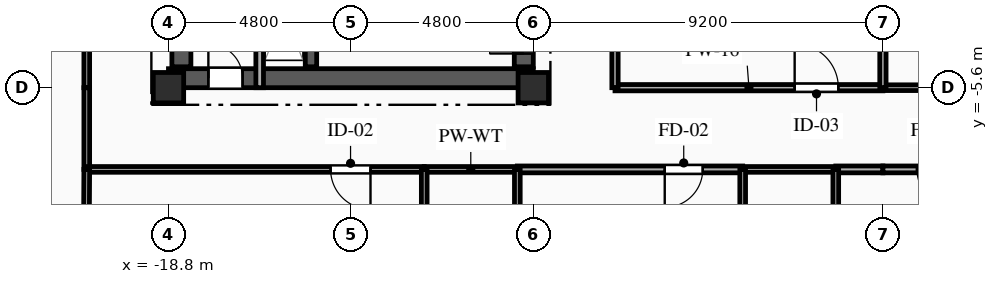
"""IFC4 building model, lengths in metres.
Left out: names, types, materials, properties, quantities, classifications, styles, units other than length and angle.
Written with IfcOpenShell. Run it as: python <this file> out.ifc"""

import sys

from ifc_helpers import new_model, si_unit, direction, frame, frame_2d, origin, origin_2d, place, context, subcontext, project, spatial, rectangle, extrude, element, fill, save


model = new_model("IFC4")
c1 = context("Model", 3, precision=1e-05, world=origin(), true_north=direction((0.0, 1.0)))
c2 = subcontext(c1, "Body", "Model", "MODEL_VIEW")
j1 = project(units=[si_unit("LENGTHUNIT", "METRE"), si_unit("PLANEANGLEUNIT", "RADIAN")], contexts=[c1])
p1 = place(None, origin())
s1 = spatial("IfcSite", under=j1, at=p1, CompositionType="ELEMENT")
p2 = place(p1, origin())
s2 = spatial("IfcBuilding", under=s1, at=p2, CompositionType="ELEMENT")
p3 = place(p2, frame((0.0, 0.0, 193.05)))
s3 = spatial("IfcBuildingStorey", under=s2, at=p3, CompositionType="ELEMENT", Elevation=193.05)
for number, where, z_axis, x_axis in (
    (1, (-18.8, -5.6, 0.0), (0.0, 0.0, 1.0), (1.0, 0.0, 0.0)),
    (2, (-9.2, -5.6, 0.0), (0.0, 0.0, 1.0), (1.0, 0.0, 0.0)),
):
    element("IfcColumn", number, at=place(p3, frame(where, z_axis=z_axis, x_axis=x_axis)), inside=s3, PredefinedType="COLUMN", context=c2, shape_type="SweptSolid", body=[
        extrude(rectangle(XDim=0.8, YDim=0.8, at=origin_2d()), origin(), (0.0, 0.0, 1.0), 3.35),
    ])
p4 = place(p3, frame((-18.8, -5.35, 0.0), z_axis=(0.0, 0.0, 1.0), x_axis=(1.0, 0.0, 0.0)))
e3 = element("IfcWall", 3, at=p4, inside=s3, PredefinedType="SHEAR", context=c2, shape_type="SweptSolid", body=[
    extrude(rectangle(XDim=9.6, YDim=0.5, at=frame_2d((4.8, 0.0))), origin(), (0.0, 0.0, 1.0), 3.04),
])
p5 = place(p4, frame((1.05, 0.0, 0.0)))
e4 = element("IfcOpeningElement", 4, at=p5, cuts=e3, PredefinedType="OPENING", context=c2, shape_type="SweptSolid", body=[
    extrude(rectangle(XDim=0.9, YDim=2.1, at=frame_2d((0.45, 1.05))), frame((0.0, 0.26, 0.0), z_axis=(0.0, -1.0, 0.0), x_axis=(1.0, 0.0, 0.0)), (0.0, 0.0, 1.0), 0.52),
])
p6 = place(p3, frame((-18.46, -5.05, 0.0), z_axis=(0.0, 0.0, 1.0), x_axis=(0.0, 1.0, 0.0)))
e5 = element("IfcWall", 5, at=p6, inside=s3, PredefinedType="SHEAR", context=c2, shape_type="SweptSolid", body=[
    extrude(rectangle(XDim=10.1, YDim=0.5, at=frame_2d((5.05, 0.0))), origin(), (0.0, 0.0, 1.0), 3.04),
])
p7 = place(p3, frame((-9.45, -5.05, 0.0), z_axis=(0.0, 0.0, 1.0), x_axis=(0.0, 1.0, 0.0)))
e6 = element("IfcWall", 6, at=p7, inside=s3, PredefinedType="SHEAR", context=c2, shape_type="SweptSolid", body=[
    extrude(rectangle(XDim=10.1, YDim=0.5, at=frame_2d((5.05, 0.0))), origin(), (0.0, 0.0, 1.0), 3.04),
])
p8 = place(p7, frame((7.15, 0.0, 0.0)))
e7 = element("IfcOpeningElement", 7, at=p8, cuts=e6, PredefinedType="OPENING", context=c2, shape_type="SweptSolid", body=[
    extrude(rectangle(XDim=0.9, YDim=2.1, at=frame_2d((0.45, 1.05))), frame((0.0, 0.26, 0.0), z_axis=(0.0, -1.0, 0.0), x_axis=(1.0, 0.0, 0.0)), (0.0, 0.0, 1.0), 0.52),
])
p9 = place(p7, frame((2.4, 0.0, 0.0)))
e8 = element("IfcOpeningElement", 8, at=p9, cuts=e6, PredefinedType="OPENING", context=c2, shape_type="SweptSolid", body=[
    extrude(rectangle(XDim=1.2, YDim=2.15, at=frame_2d((0.6, 1.075))), frame((0.0, 0.26, 0.0), z_axis=(0.0, -1.0, 0.0), x_axis=(1.0, 0.0, 0.0)), (0.0, 0.0, 1.0), 0.52),
])
p10 = place(p7, frame((0.35, 0.0, 0.0)))
e9 = element("IfcOpeningElement", 9, at=p10, cuts=e6, PredefinedType="OPENING", context=c2, shape_type="SweptSolid", body=[
    extrude(rectangle(XDim=0.9, YDim=2.1, at=frame_2d((0.45, 1.05))), frame((0.0, 0.26, 0.0), z_axis=(0.0, -1.0, 0.0), x_axis=(1.0, 0.0, 0.0)), (0.0, 0.0, 1.0), 0.52),
])
p11 = place(p7, frame((5.0, 0.0, 0.0)))
e10 = element("IfcOpeningElement", 10, at=p11, cuts=e6, PredefinedType="OPENING", context=c2, shape_type="SweptSolid", body=[
    extrude(rectangle(XDim=0.9, YDim=2.1, at=frame_2d((0.45, 1.05))), frame((0.0, 0.26, 0.0), z_axis=(0.0, -1.0, 0.0), x_axis=(1.0, 0.0, 0.0)), (0.0, 0.0, 1.0), 0.52),
])
p12 = place(p3, frame((-15.05, -5.05, 0.0), z_axis=(0.0, 0.0, 1.0), x_axis=(0.0, 1.0, 0.0)))
e11 = element("IfcWall", 11, at=p12, inside=s3, PredefinedType="SHEAR", context=c2, shape_type="SweptSolid", body=[
    extrude(rectangle(XDim=10.1, YDim=0.3, at=frame_2d((5.05, 0.0))), origin(), (0.0, 0.0, 1.0), 3.04),
])
p13 = place(p3, frame((-16.4, -5.6, 0.0), z_axis=(0.0, 0.0, 1.0), x_axis=(0.0, 1.0, 0.0)))
e12 = element("IfcWall", 12, at=p13, inside=s3, PredefinedType="PARTITIONING", context=c2, shape_type="SweptSolid", body=[
    extrude(rectangle(XDim=3.49, YDim=0.2, at=frame_2d((1.745, 0.0))), origin(), (0.0, 0.0, 1.0), 3.04),
])
p14 = place(p3, frame((-20.95, -7.75, 0.0), z_axis=(0.0, 0.0, 1.0), x_axis=(0.0, 1.0, 0.0)))
e13 = element("IfcWall", 13, at=p14, inside=s3, PredefinedType="PARTITIONING", context=c2, shape_type="SweptSolid", body=[
    extrude(rectangle(XDim=2.15, YDim=0.15, at=frame_2d((1.075, 0.0))), origin(), (0.0, 0.0, 1.0), 3.04),
])
p15 = place(p3, frame((-12.07, -7.75, 0.0), z_axis=(0.0, 0.0, 1.0), x_axis=(-1.0, 0.0, 0.0)))
e14 = element("IfcWall", 14, at=p15, inside=s3, PredefinedType="PARTITIONING", context=c2, shape_type="SweptSolid", body=[
    extrude(rectangle(XDim=8.88, YDim=0.15, at=frame_2d((4.44, 0.0))), origin(), (0.0, 0.0, 1.0), 3.04),
])
p16 = place(p15, frame((1.414, 0.0, 0.0)))
e15 = element("IfcOpeningElement", 15, at=p16, cuts=e14, PredefinedType="OPENING", context=c2, shape_type="SweptSolid", body=[
    extrude(rectangle(XDim=1.05, YDim=2.15, at=frame_2d((0.525, 1.075))), frame((0.0, 0.085, 0.0), z_axis=(0.0, -1.0, 0.0), x_axis=(1.0, 0.0, 0.0)), (0.0, 0.0, 1.0), 0.17),
])
p17 = place(p3, frame((-3.69, -7.75, 0.0), z_axis=(0.0, 0.0, 1.0), x_axis=(-1.0, 0.0, 0.0)))
e16 = element("IfcWall", 16, at=p17, inside=s3, PredefinedType="PARTITIONING", context=c2, shape_type="SweptSolid", body=[
    extrude(rectangle(XDim=5.93, YDim=0.18, at=frame_2d((2.965, 0.0))), origin(), (0.0, 0.0, 1.0), 3.04),
])
p18 = place(p17, frame((1.051, 0.0, 0.0)))
e17 = element("IfcOpeningElement", 17, at=p18, cuts=e16, PredefinedType="OPENING", context=c2, shape_type="SweptSolid", body=[
    extrude(rectangle(XDim=1.0, YDim=2.15, at=frame_2d((0.5, 1.075))), frame((0.0, 0.1, 0.0), z_axis=(0.0, -1.0, 0.0), x_axis=(1.0, 0.0, 0.0)), (0.0, 0.0, 1.0), 0.2),
])
p19 = place(p3, frame((-9.62, -7.75, 0.0), z_axis=(0.0, 0.0, 1.0), x_axis=(-1.0, 0.0, 0.0)))
e18 = element("IfcWall", 18, at=p19, inside=s3, PredefinedType="PLUMBINGWALL", context=c2, shape_type="SweptSolid", body=[
    extrude(rectangle(XDim=2.45, YDim=0.15, at=frame_2d((1.225, 0.0))), origin(), (0.0, 0.0, 1.0), 3.04),
])
p20 = place(p3, frame((0.0, -7.75, 0.0), z_axis=(0.0, 0.0, 1.0), x_axis=(-1.0, 0.0, 0.0)))
e19 = element("IfcWall", 19, at=p20, inside=s3, PredefinedType="PARTITIONING", context=c2, shape_type="SweptSolid", body=[
    extrude(rectangle(XDim=1.24, YDim=0.18, at=frame_2d((0.62, 0.0))), origin(), (0.0, 0.0, 1.0), 3.04),
])
p21 = place(p3, frame((-1.24, -7.75, 0.0), z_axis=(0.0, 0.0, 1.0), x_axis=(-1.0, 0.0, 0.0)))
e20 = element("IfcWall", 20, at=p21, inside=s3, PredefinedType="PLUMBINGWALL", context=c2, shape_type="SweptSolid", body=[
    extrude(rectangle(XDim=2.45, YDim=0.15, at=frame_2d((1.225, 0.0))), origin(), (0.0, 0.0, 1.0), 3.04),
])
p22 = place(p3, frame((-7.05, -5.6, 0.0), z_axis=(0.0, 0.0, 1.0), x_axis=(1.0, 0.0, 0.0)))
e21 = element("IfcWall", 21, at=p22, inside=s3, PredefinedType="PARTITIONING", context=c2, shape_type="SweptSolid", body=[
    extrude(rectangle(XDim=7.05, YDim=0.165, at=frame_2d((3.525, 0.0))), origin(), (0.0, 0.0, 1.0), 2.525),
])
p23 = place(p22, frame((4.728, 0.0, 0.0)))
e22 = element("IfcOpeningElement", 22, at=p23, cuts=e21, PredefinedType="OPENING", context=c2, shape_type="SweptSolid", body=[
    extrude(rectangle(XDim=1.15, YDim=2.15, at=frame_2d((0.575, 1.075))), frame((0.0, 0.093, 0.0), z_axis=(0.0, -1.0, 0.0), x_axis=(1.0, 0.0, 0.0)), (0.0, 0.0, 1.0), 0.185),
])
p24 = place(p3, frame((4.69, -7.75, 0.0), z_axis=(0.0, 0.0, 1.0), x_axis=(-1.0, 0.0, 0.0)))
e23 = element("IfcWall", 23, at=p24, inside=s3, PredefinedType="PARTITIONING", context=c2, shape_type="SweptSolid", body=[
    extrude(rectangle(XDim=4.69, YDim=0.18, at=frame_2d((2.345, 0.0))), origin(), (0.0, 0.0, 1.0), 3.04),
])
p25 = place(p24, frame((2.794, 0.0, 0.0)))
e24 = element("IfcOpeningElement", 24, at=p25, cuts=e23, PredefinedType="OPENING", context=c2, shape_type="SweptSolid", body=[
    extrude(rectangle(XDim=1.0, YDim=2.15, at=frame_2d((0.5, 1.075))), frame((0.0, 0.1, 0.0), z_axis=(0.0, -1.0, 0.0), x_axis=(1.0, 0.0, 0.0)), (0.0, 0.0, 1.0), 0.2),
])
p26 = place(p3, frame((0.0, -5.6, 0.0), z_axis=(0.0, 0.0, 1.0), x_axis=(1.0, 0.0, 0.0)))
e25 = element("IfcWall", 25, at=p26, inside=s3, PredefinedType="PARTITIONING", context=c2, shape_type="SweptSolid", body=[
    extrude(rectangle(XDim=7.05, YDim=0.15, at=frame_2d((3.525, 0.0))), origin(), (0.0, 0.0, 1.0), 2.525),
])
p27 = place(p26, frame((1.185, 0.0, 0.0)))
e26 = element("IfcOpeningElement", 26, at=p27, cuts=e25, PredefinedType="OPENING", context=c2, shape_type="SweptSolid", body=[
    extrude(rectangle(XDim=1.05, YDim=2.15, at=frame_2d((0.525, 1.075))), frame((0.0, 0.085, 0.0), z_axis=(0.0, -1.0, 0.0), x_axis=(1.0, 0.0, 0.0)), (0.0, 0.0, 1.0), 0.17),
])
p28 = place(p3, frame((-20.95, -5.6, 0.0), z_axis=(0.0, 0.0, 1.0), x_axis=(0.0, 1.0, 0.0)))
e27 = element("IfcWall", 27, at=p28, inside=s3, PredefinedType="PARTITIONING", context=c2, shape_type="SweptSolid", body=[
    extrude(rectangle(XDim=7.867, YDim=0.15, at=frame_2d((3.934, 0.0))), origin(), (0.0, 0.0, 1.0), 3.04),
])
p29 = place(p28, frame((4.823, 0.0, 0.0)))
e28 = element("IfcOpeningElement", 28, at=p29, cuts=e27, PredefinedType="OPENING", context=c2, shape_type="SweptSolid", body=[
    extrude(rectangle(XDim=1.05, YDim=2.15, at=frame_2d((0.525, 1.075))), frame((0.0, 0.085, 0.0), z_axis=(0.0, -1.0, 0.0), x_axis=(1.0, 0.0, 0.0)), (0.0, 0.0, 1.0), 0.17),
])
p30 = place(p3, frame((-7.05, -2.95, 0.0), z_axis=(0.0, 0.0, 1.0), x_axis=(0.0, -1.0, 0.0)))
e29 = element("IfcWall", 29, at=p30, inside=s3, PredefinedType="PARTITIONING", context=c2, shape_type="SweptSolid", body=[
    extrude(rectangle(XDim=2.65, YDim=0.165, at=frame_2d((1.325, 0.0))), origin(), (0.0, 0.0, 1.0), 3.04),
])
p31 = place(p3, frame((-20.95, -7.75, 0.0), z_axis=(0.0, 0.0, 1.0), x_axis=(-0.005804668564, -0.99998315277, 0.0)))
e30 = element("IfcWall", 30, at=p31, inside=s3, PredefinedType="PARTITIONING", context=c2, shape_type="SweptSolid", body=[
    extrude(rectangle(XDim=7.571, YDim=0.15, at=frame_2d((3.785, 0.0))), origin(), (0.0, 0.0, 1.0), 3.04),
])
p32 = place(p3, frame((-12.07, -7.75, 0.0), z_axis=(0.0, 0.0, 1.0), x_axis=(0.0, -1.0, 0.0)))
e31 = element("IfcWall", 31, at=p32, inside=s3, PredefinedType="PLUMBINGWALL", context=c2, shape_type="SweptSolid", body=[
    extrude(rectangle(XDim=2.15, YDim=0.15, at=frame_2d((1.075, 0.0))), origin(), (0.0, 0.0, 1.0), 3.04),
])
p33 = place(p3, frame((-9.62, -9.9, 0.0), z_axis=(0.0, 0.0, 1.0), x_axis=(0.0, 1.0, 0.0)))
e32 = element("IfcWall", 32, at=p33, inside=s3, PredefinedType="PLUMBINGWALL", context=c2, shape_type="SweptSolid", body=[
    extrude(rectangle(XDim=2.15, YDim=0.15, at=frame_2d((1.075, 0.0))), origin(), (0.0, 0.0, 1.0), 2.665),
])
for number, where, z_axis, x_axis in (
    (33, (-3.69, -7.75, 0.0), (0.0, 0.0, 1.0), (0.0, -1.0, 0.0)),
    (34, (-1.24, -9.9, 0.0), (0.0, 0.0, 1.0), (0.0, 1.0, 0.0)),
):
    element("IfcWall", number, at=place(p3, frame(where, z_axis=z_axis, x_axis=x_axis)), inside=s3, PredefinedType="PLUMBINGWALL", context=c2, shape_type="SweptSolid", body=[
        extrude(rectangle(XDim=2.15, YDim=0.15, at=frame_2d((1.075, 0.0))), origin(), (0.0, 0.0, 1.0), 3.04),
    ])
p34 = place(p3, frame((0.0, -2.95, 0.0), z_axis=(0.0, 0.0, 1.0), x_axis=(0.0, -1.0, 0.0)))
e35 = element("IfcWall", 35, at=p34, inside=s3, PredefinedType="PARTITIONING", context=c2, shape_type="SweptSolid", body=[
    extrude(rectangle(XDim=2.65, YDim=0.165, at=frame_2d((1.325, 0.0))), origin(), (0.0, 0.0, 1.0), 3.04),
])
p35 = place(p5, origin())
e36 = element("IfcDoor", 36, at=p35, inside=s3, OperationType="SINGLE_SWING_LEFT", PredefinedType="DOOR", context=c2, shape_type="SweptSolid", body=[
    extrude(rectangle(XDim=0.9, YDim=2.1, at=frame_2d((0.45, 1.05))), frame((0.0, 0.025, 0.0), z_axis=(0.0, -1.0, 0.0), x_axis=(1.0, 0.0, 0.0)), (0.0, 0.0, 1.0), 0.05),
])
fill(e4, e36)
p36 = place(p10, origin())
e37 = element("IfcDoor", 37, at=p36, inside=s3, OperationType="SINGLE_SWING_LEFT", PredefinedType="DOOR", context=c2, shape_type="SweptSolid", body=[
    extrude(rectangle(XDim=0.9, YDim=2.1, at=frame_2d((0.45, 1.05))), frame((0.0, 0.025, 0.0), z_axis=(0.0, -1.0, 0.0), x_axis=(1.0, 0.0, 0.0)), (0.0, 0.0, 1.0), 0.05),
])
fill(e9, e37)
p37 = place(p16, origin())
e38 = element("IfcDoor", 38, at=p37, inside=s3, OperationType="SINGLE_SWING_LEFT", PredefinedType="DOOR", context=c2, shape_type="SweptSolid", body=[
    extrude(rectangle(XDim=1.05, YDim=2.15, at=frame_2d((0.525, 1.075))), frame((0.0, 0.025, 0.0), z_axis=(0.0, -1.0, 0.0), x_axis=(1.0, 0.0, 0.0)), (0.0, 0.0, 1.0), 0.05),
])
fill(e15, e38)
p38 = place(p18, origin())
e39 = element("IfcDoor", 39, at=p38, inside=s3, OperationType="SINGLE_SWING_RIGHT", PredefinedType="DOOR", context=c2, shape_type="SweptSolid", body=[
    extrude(rectangle(XDim=1.0, YDim=2.15, at=frame_2d((0.5, 1.075))), frame((0.0, 0.025, 0.0), z_axis=(0.0, -1.0, 0.0), x_axis=(1.0, 0.0, 0.0)), (0.0, 0.0, 1.0), 0.05),
])
fill(e17, e39)
p39 = place(p23, origin())
e40 = element("IfcDoor", 40, at=p39, inside=s3, OperationType="SINGLE_SWING_LEFT", PredefinedType="DOOR", context=c2, shape_type="SweptSolid", body=[
    extrude(rectangle(XDim=1.15, YDim=2.15, at=frame_2d((0.575, 1.075))), frame((0.0, 0.025, 0.0), z_axis=(0.0, -1.0, 0.0), x_axis=(1.0, 0.0, 0.0)), (0.0, 0.0, 1.0), 0.05),
])
fill(e22, e40)
p40 = place(p25, origin())
e41 = element("IfcDoor", 41, at=p40, inside=s3, OperationType="SINGLE_SWING_LEFT", PredefinedType="DOOR", context=c2, shape_type="SweptSolid", body=[
    extrude(rectangle(XDim=1.0, YDim=2.15, at=frame_2d((0.5, 1.075))), frame((0.0, 0.025, 0.0), z_axis=(0.0, -1.0, 0.0), x_axis=(1.0, 0.0, 0.0)), (0.0, 0.0, 1.0), 0.05),
])
fill(e24, e41)
save(model, sys.argv[1])
